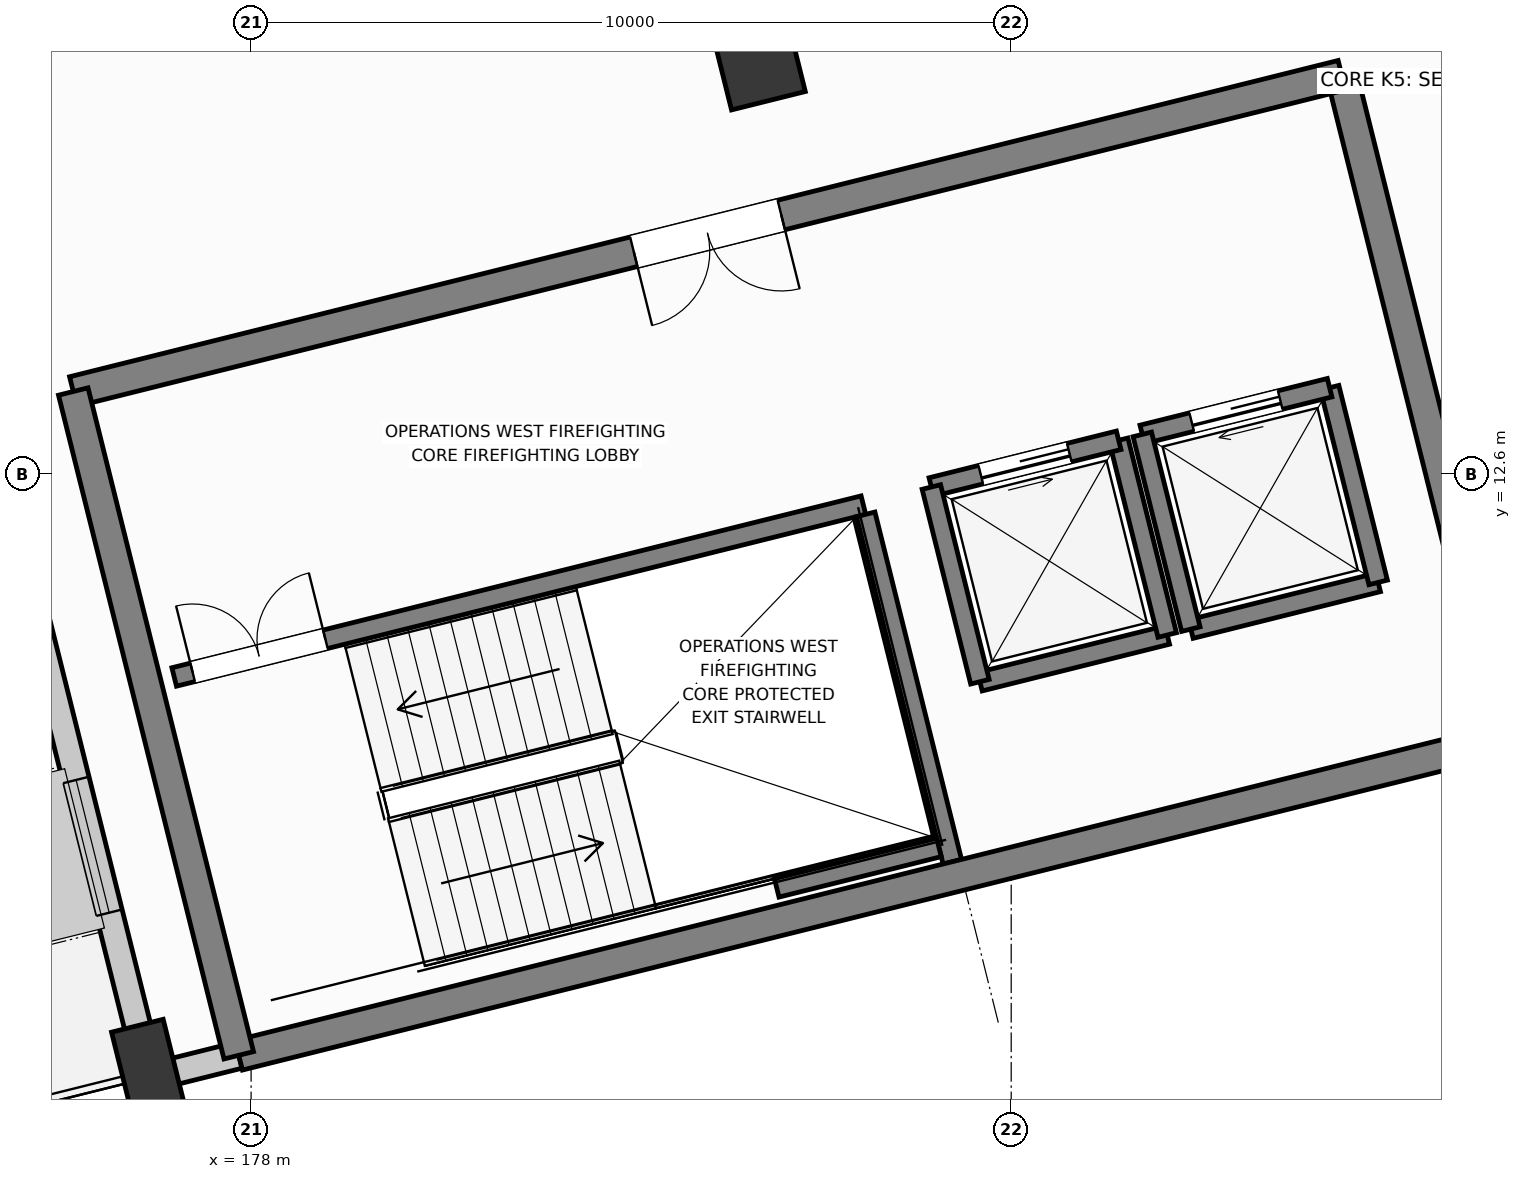
"""IFC4 building model, lengths in metres.
Left out: names, types, materials, properties, quantities, classifications, styles, units other than length and angle.
Written with IfcOpenShell. Run it as: python <this file> out.ifc"""

import sys

from ifc_helpers import new_model, si_unit, direction, frame, frame_2d, origin, origin_2d, place, context, subcontext, project, spatial, rectangle, extrude, element, fill, save


model = new_model("IFC4")
c1 = context("Model", 3, precision=1e-05, world=origin(), true_north=direction((0.0, 1.0)))
c2 = subcontext(c1, "Body", "Model", "MODEL_VIEW")
j1 = project(units=[si_unit("LENGTHUNIT", "METRE"), si_unit("PLANEANGLEUNIT", "RADIAN")], contexts=[c1])
p1 = place(None, origin())
s1 = spatial("IfcSite", under=j1, at=p1, CompositionType="ELEMENT")
p2 = place(p1, origin())
s2 = spatial("IfcBuilding", under=s1, at=p2, CompositionType="ELEMENT")
p3 = place(p2, frame((0.0, 0.0, 16.2)))
s3 = spatial("IfcBuildingStorey", under=s2, at=p3, CompositionType="ELEMENT", Elevation=16.2)
p4 = place(p3, frame((176.673, 4.661, 0.0), z_axis=(0.0, 0.0, 1.0), x_axis=(0.970295726276, 0.2419218956, 0.0)))
e1 = element("IfcColumn", 1, at=p4, inside=s3, PredefinedType="COLUMN", context=c2, shape_type="SweptSolid", body=[
    extrude(rectangle(XDim=0.7, YDim=1.4, at=origin_2d()), origin(), (0.0, 0.0, 1.0), 4.2),
])
p5 = place(p3, frame((184.685, 17.995, 0.0), z_axis=(0.0, 0.0, 1.0), x_axis=(0.970295726276, 0.2419218956, 0.0)))
e2 = element("IfcColumn", 2, at=p5, inside=s3, PredefinedType="COLUMN", context=c2, shape_type="SweptSolid", body=[
    extrude(rectangle(XDim=1.0, YDim=1.0, at=origin_2d()), origin(), (0.0, 0.0, 1.0), 4.2),
])
p6 = place(p3, frame((174.125, 14.883, 0.0), z_axis=(0.0, 0.0, 1.0), x_axis=(0.241920507487, -0.97029607237, 0.0)))
e3 = element("IfcWall", 3, at=p6, inside=s3, PredefinedType="STANDARD", context=c2, shape_type="SweptSolid", body=[
    extrude(rectangle(XDim=9.87, YDim=0.35, at=frame_2d((4.935, 0.0))), origin(), (0.0, 0.0, 1.0), 2.785),
])
p7 = place(p6, frame((1.567, 0.0, 0.85)))
e4 = element("IfcOpeningElement", 4, at=p7, cuts=e3, PredefinedType="OPENING", context=c2, shape_type="SweptSolid", body=[
    extrude(rectangle(XDim=1.8, YDim=1.65, at=frame_2d((0.9, 0.825))), frame((0.0, 0.185, 0.0), z_axis=(0.0, -1.0, 0.0), x_axis=(1.0, 0.0, 0.0)), (0.0, 0.0, 1.0), 0.37),
])
p8 = place(p6, frame((6.502, 0.0, 0.85)))
e5 = element("IfcOpeningElement", 5, at=p8, cuts=e3, PredefinedType="OPENING", context=c2, shape_type="SweptSolid", body=[
    extrude(rectangle(XDim=1.8, YDim=1.65, at=frame_2d((0.9, 0.825))), frame((0.0, 0.185, 0.0), z_axis=(0.0, -1.0, 0.0), x_axis=(1.0, 0.0, 0.0)), (0.0, 0.0, 1.0), 0.37),
])
p9 = place(p3, frame((176.673, 4.661, 0.0), z_axis=(0.0, 0.0, 1.0), x_axis=(0.970294277425, 0.24192770655, 0.0)))
e6 = element("IfcWall", 6, at=p9, inside=s3, PredefinedType="STANDARD", context=c2, shape_type="SweptSolid", body=[
    extrude(rectangle(XDim=1.2, YDim=0.35, at=frame_2d((0.6, 0.0))), origin(), (0.0, 0.0, 1.0), 3.845),
])
p10 = place(p3, frame((187.588, 9.866, 0.0), z_axis=(0.0, 0.0, 1.0), x_axis=(0.97029284861, 0.241933436994, 0.0)))
e7 = element("IfcWall", 7, at=p10, inside=s3, PredefinedType="SOLIDWALL", context=c2, shape_type="SweptSolid", body=[
    extrude(rectangle(XDim=2.54, YDim=0.25, at=frame_2d((1.27, 0.0))), origin(), (0.0, 0.0, 1.0), 3.87),
])
p11 = place(p3, frame((190.053, 10.481, 0.0), z_axis=(0.0, 0.0, 1.0), x_axis=(-0.241938414856, 0.970291607413, 0.0)))
e8 = element("IfcWall", 8, at=p11, inside=s3, PredefinedType="SOLIDWALL", context=c2, shape_type="SweptSolid", body=[
    extrude(rectangle(XDim=2.64, YDim=0.25, at=frame_2d((1.32, 0.0))), origin(), (0.0, 0.0, 1.0), 3.87),
])
p12 = place(p3, frame((189.414, 13.042, 0.0), z_axis=(0.0, 0.0, 1.0), x_axis=(-0.97029284861, -0.241933436994, 0.0)))
e9 = element("IfcWall", 9, at=p12, inside=s3, PredefinedType="SOLIDWALL", context=c2, shape_type="SweptSolid", body=[
    extrude(rectangle(XDim=2.54, YDim=0.25, at=frame_2d((1.27, 0.0))), origin(), (0.0, 0.0, 1.0), 3.87),
])
p13 = place(p12, frame((0.67, 0.0, 0.0)))
e10 = element("IfcOpeningElement", 10, at=p13, cuts=e9, PredefinedType="OPENING", context=c2, shape_type="SweptSolid", body=[
    extrude(rectangle(XDim=1.2, YDim=2.2, at=frame_2d((0.6, 1.1))), frame((0.0, 0.135, 0.0), z_axis=(0.0, -1.0, 0.0), x_axis=(1.0, 0.0, 0.0)), (0.0, 0.0, 1.0), 0.27),
])
p14 = place(p3, frame((186.95, 12.428, 0.0), z_axis=(0.0, 0.0, 1.0), x_axis=(0.241938414856, -0.970291607413, 0.0)))
e11 = element("IfcWall", 11, at=p14, inside=s3, PredefinedType="SOLIDWALL", context=c2, shape_type="SweptSolid", body=[
    extrude(rectangle(XDim=2.64, YDim=0.25, at=frame_2d((1.32, 0.0))), origin(), (0.0, 0.0, 1.0), 3.87),
])
p15 = place(p3, frame((190.363, 10.558, 0.0), z_axis=(0.0, 0.0, 1.0), x_axis=(0.97029284861, 0.241933436994, 0.0)))
e12 = element("IfcWall", 12, at=p15, inside=s3, PredefinedType="SOLIDWALL", context=c2, shape_type="SweptSolid", body=[
    extrude(rectangle(XDim=2.54, YDim=0.25, at=frame_2d((1.27, 0.0))), origin(), (0.0, 0.0, 1.0), 3.87),
])
p16 = place(p3, frame((192.828, 11.173, 0.0), z_axis=(0.0, 0.0, 1.0), x_axis=(-0.241938414856, 0.970291607413, 0.0)))
e13 = element("IfcWall", 13, at=p16, inside=s3, PredefinedType="SOLIDWALL", context=c2, shape_type="SweptSolid", body=[
    extrude(rectangle(XDim=2.64, YDim=0.25, at=frame_2d((1.32, 0.0))), origin(), (0.0, 0.0, 1.0), 3.87),
])
p17 = place(p3, frame((192.189, 13.734, 0.0), z_axis=(0.0, 0.0, 1.0), x_axis=(-0.97029284861, -0.241933436994, 0.0)))
e14 = element("IfcWall", 14, at=p17, inside=s3, PredefinedType="SOLIDWALL", context=c2, shape_type="SweptSolid", body=[
    extrude(rectangle(XDim=2.54, YDim=0.25, at=frame_2d((1.27, 0.0))), origin(), (0.0, 0.0, 1.0), 3.87),
])
p18 = place(p17, frame((0.67, 0.0, 0.0)))
e15 = element("IfcOpeningElement", 15, at=p18, cuts=e14, PredefinedType="OPENING", context=c2, shape_type="SweptSolid", body=[
    extrude(rectangle(XDim=1.2, YDim=2.2, at=frame_2d((0.6, 1.1))), frame((0.0, 0.135, 0.0), z_axis=(0.0, -1.0, 0.0), x_axis=(1.0, 0.0, 0.0)), (0.0, 0.0, 1.0), 0.27),
])
p19 = place(p3, frame((189.725, 13.12, 0.0), z_axis=(0.0, 0.0, 1.0), x_axis=(0.241938414856, -0.970291607413, 0.0)))
e16 = element("IfcWall", 16, at=p19, inside=s3, PredefinedType="SOLIDWALL", context=c2, shape_type="SweptSolid", body=[
    extrude(rectangle(XDim=2.64, YDim=0.25, at=frame_2d((1.32, 0.0))), origin(), (0.0, 0.0, 1.0), 3.87),
])
p20 = place(p3, frame((176.988, 9.929, 0.0), z_axis=(0.0, 0.0, 1.0), x_axis=(0.970297151331, 0.241916179943, 0.0)))
e17 = element("IfcWall", 17, at=p20, inside=s3, PredefinedType="SOLIDWALL", context=c2, shape_type="SweptSolid", body=[
    extrude(rectangle(XDim=9.345, YDim=0.25, at=frame_2d((4.673, 0.0))), origin(), (0.0, 0.0, 1.0), 3.84),
])
p21 = place(p20, frame((0.25, 0.0, 0.0)))
e18 = element("IfcOpeningElement", 18, at=p21, cuts=e17, PredefinedType="OPENING", context=c2, shape_type="SweptSolid", body=[
    extrude(rectangle(XDim=1.8, YDim=2.25, at=frame_2d((0.9, 1.125))), frame((0.0, 0.135, 0.0), z_axis=(0.0, -1.0, 0.0), x_axis=(1.0, 0.0, 0.0)), (0.0, 0.0, 1.0), 0.27),
])
p22 = place(p3, frame((187.225, 7.498, 0.0), z_axis=(0.0, 0.0, 1.0), x_axis=(-0.241911120435, 0.970298412763, 0.0)))
e19 = element("IfcWall", 19, at=p22, inside=s3, PredefinedType="SOLIDWALL", context=c2, shape_type="SweptSolid", body=[
    extrude(rectangle(XDim=4.71, YDim=0.25, at=frame_2d((2.355, 0.0))), origin(), (0.0, 0.0, 1.0), 3.84),
])
p23 = place(p3, frame((184.915, 7.154, 0.0), z_axis=(0.0, 0.0, 1.0), x_axis=(0.97029738597, 0.241915238833, 0.0)))
e20 = element("IfcWall", 20, at=p23, inside=s3, PredefinedType="SOLIDWALL", context=c2, shape_type="SweptSolid", body=[
    extrude(rectangle(XDim=2.2, YDim=0.25, at=frame_2d((1.1, 0.0))), origin(), (0.0, 0.0, 1.0), 3.84),
])
p24 = place(p3, frame((177.838, 4.951, 0.0), z_axis=(0.0, 0.0, 1.0), x_axis=(0.970295179998, 0.241924086589, 0.0)))
e21 = element("IfcWall", 21, at=p24, inside=s3, PredefinedType="SHEAR", context=c2, shape_type="SweptSolid", body=[
    extrude(rectangle(XDim=17.2, YDim=0.4, at=frame_2d((8.6, 0.0))), origin(), (0.0, 0.0, 1.0), 3.87),
])
p25 = place(p3, frame((194.527, 9.113, 0.0), z_axis=(0.0, 0.0, 1.0), x_axis=(-0.241923808098, 0.970295249435, 0.0)))
e22 = element("IfcWall", 22, at=p25, inside=s3, PredefinedType="SHEAR", context=c2, shape_type="SweptSolid", body=[
    extrude(rectangle(XDim=9.0, YDim=0.4, at=frame_2d((4.5, 0.0))), origin(), (0.0, 0.0, 1.0), 3.87),
])
p26 = place(p3, frame((192.349, 17.845, 0.0), z_axis=(0.0, 0.0, 1.0), x_axis=(-0.970296544738, -0.241918612906, 0.0)))
e23 = element("IfcWall", 23, at=p26, inside=s3, PredefinedType="SHEAR", context=c2, shape_type="SweptSolid", body=[
    extrude(rectangle(XDim=17.2, YDim=0.4, at=frame_2d((8.6, 0.0))), origin(), (0.0, 0.0, 1.0), 3.87),
])
p27 = place(p26, frame((7.6, 0.0, 0.0)))
e24 = element("IfcOpeningElement", 24, at=p27, cuts=e23, PredefinedType="OPENING", context=c2, shape_type="SweptSolid", body=[
    extrude(rectangle(XDim=2.0, YDim=2.3, at=frame_2d((1.0, 1.15))), frame((0.0, 0.21, 0.0), z_axis=(0.0, -1.0, 0.0), x_axis=(1.0, 0.0, 0.0)), (0.0, 0.0, 1.0), 0.42),
])
p28 = place(p3, frame((175.66, 13.684, 0.0), z_axis=(0.0, 0.0, 1.0), x_axis=(0.241921199913, -0.97029589973, 0.0)))
e25 = element("IfcWall", 25, at=p28, inside=s3, PredefinedType="SHEAR", context=c2, shape_type="SweptSolid", body=[
    extrude(rectangle(XDim=9.0, YDim=0.4, at=frame_2d((4.5, 0.0))), origin(), (0.0, 0.0, 1.0), 3.87),
])
p29 = place(p8, origin())
e26 = element("IfcWindow", 26, at=p29, inside=s3, PartitioningType="SINGLE_PANEL", PredefinedType="WINDOW", context=c2, shape_type="SweptSolid", body=[
    extrude(rectangle(XDim=1.8, YDim=1.65, at=frame_2d((0.9, 0.825))), frame((0.0, 0.03, 0.0), z_axis=(0.0, -1.0, 0.0), x_axis=(1.0, 0.0, 0.0)), (0.0, 0.0, 1.0), 0.06),
])
fill(e5, e26)
p30 = place(p13, origin())
e27 = element("IfcDoor", 27, at=p30, inside=s3, OperationType="SLIDING_TO_LEFT", PredefinedType="DOOR", context=c2, shape_type="SweptSolid", body=[
    extrude(rectangle(XDim=1.2, YDim=2.2, at=frame_2d((0.6, 1.1))), frame((0.0, 0.025, 0.0), z_axis=(0.0, -1.0, 0.0), x_axis=(1.0, 0.0, 0.0)), (0.0, 0.0, 1.0), 0.05),
])
fill(e10, e27)
p31 = place(p18, origin())
e28 = element("IfcDoor", 28, at=p31, inside=s3, OperationType="SLIDING_TO_RIGHT", PredefinedType="DOOR", context=c2, shape_type="SweptSolid", body=[
    extrude(rectangle(XDim=1.2, YDim=2.2, at=frame_2d((0.6, 1.1))), frame((0.0, 0.025, 0.0), z_axis=(0.0, -1.0, 0.0), x_axis=(1.0, 0.0, 0.0)), (0.0, 0.0, 1.0), 0.05),
])
fill(e15, e28)
p32 = place(p21, origin())
e29 = element("IfcDoor", 29, at=p32, inside=s3, OperationType="DOUBLE_DOOR_SINGLE_SWING", PredefinedType="DOOR", context=c2, shape_type="SweptSolid", body=[
    extrude(rectangle(XDim=1.8, YDim=2.25, at=frame_2d((0.9, 1.125))), frame((0.0, 0.025, 0.0), z_axis=(0.0, -1.0, 0.0), x_axis=(1.0, 0.0, 0.0)), (0.0, 0.0, 1.0), 0.05),
])
fill(e18, e29)
p33 = place(p27, origin())
e30 = element("IfcDoor", 30, at=p33, inside=s3, OperationType="DOUBLE_DOOR_SINGLE_SWING", PredefinedType="DOOR", context=c2, shape_type="SweptSolid", body=[
    extrude(rectangle(XDim=2.0, YDim=2.3, at=frame_2d((1.0, 1.15))), frame((0.0, 0.025, 0.0), z_axis=(0.0, -1.0, 0.0), x_axis=(1.0, 0.0, 0.0)), (0.0, 0.0, 1.0), 0.05),
])
fill(e24, e30)
save(model, sys.argv[1])
